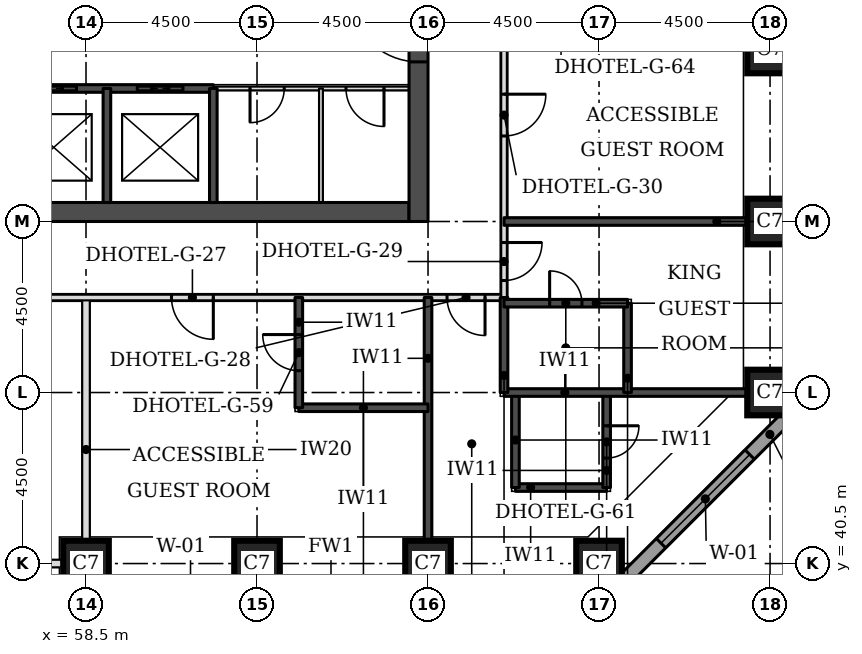
"""IFC4 building model, lengths in metres.
Left out: names, types, materials, properties, quantities, classifications, styles, units other than length and angle.
Written with IfcOpenShell. Run it as: python <this file> out.ifc"""

import sys

from ifc_helpers import new_model, si_unit, direction, frame, frame_2d, origin, origin_2d, place, context, subcontext, project, spatial, rectangle, extrude, element, fill, save


model = new_model("IFC4")
c1 = context("Model", 3, precision=1e-05, world=origin(), true_north=direction((0.0, 1.0)))
c2 = subcontext(c1, "Body", "Model", "MODEL_VIEW")
j1 = project(units=[si_unit("LENGTHUNIT", "METRE"), si_unit("PLANEANGLEUNIT", "RADIAN")], contexts=[c1])
p1 = place(None, origin())
s1 = spatial("IfcSite", under=j1, at=p1, CompositionType="ELEMENT")
p2 = place(p1, origin())
s2 = spatial("IfcBuilding", under=s1, at=p2, CompositionType="ELEMENT")
p3 = place(p2, frame((0.0, 0.0, 66.0)))
s3 = spatial("IfcBuildingStorey", under=s2, at=p3, CompositionType="ELEMENT", Elevation=66.0)
for number, where, z_axis, x_axis in (
    (1, (58.5, 40.5, 0.0), (0.0, 0.0, 1.0), (1.0, 0.0, 0.0)),
    (2, (63.0, 40.5, 0.0), (0.0, 0.0, 1.0), (1.0, 0.0, 0.0)),
    (3, (67.5, 40.5, 0.0), (0.0, 0.0, 1.0), (1.0, 0.0, 0.0)),
    (4, (72.0, 40.5, 0.0), (0.0, 0.0, 1.0), (1.0, 0.0, 0.0)),
    (5, (76.5, 45.0, 0.0), (0.0, 0.0, 1.0), (1.0, 0.0, 0.0)),
    (6, (76.5, 49.5, 0.0), (0.0, 0.0, 1.0), (1.0, 0.0, 0.0)),
    (7, (76.5, 54.0, 0.0), (0.0, 0.0, 1.0), (1.0, 0.0, 0.0)),
):
    element("IfcColumn", number, at=place(p3, frame(where, z_axis=z_axis, x_axis=x_axis)), inside=s3, PredefinedType="COLUMN", context=c2, shape_type="SweptSolid", body=[
        extrude(rectangle(XDim=1.2, YDim=1.2, at=origin_2d()), origin(), (0.0, 0.0, 1.0), 3.3),
    ])
p4 = place(p3, frame((45.5, 49.75, 0.0), z_axis=(0.0, 0.0, 1.0), x_axis=(1.0, 0.0, 0.0)))
e8 = element("IfcWall", 8, at=p4, inside=s3, PredefinedType="SHEAR", context=c2, shape_type="SweptSolid", body=[
    extrude(rectangle(XDim=21.5, YDim=0.5, at=frame_2d((10.75, 0.0))), origin(), (0.0, 0.0, 1.0), 3.3),
])
p5 = place(p3, frame((67.25, 49.5, 0.0), z_axis=(0.0, 0.0, 1.0), x_axis=(0.0, 1.0, 0.0)))
e9 = element("IfcWall", 9, at=p5, inside=s3, PredefinedType="SHEAR", context=c2, shape_type="SweptSolid", body=[
    extrude(rectangle(XDim=22.5, YDim=0.5, at=frame_2d((11.25, 0.0))), origin(), (0.0, 0.0, 1.0), 3.3),
])
p6 = place(p5, frame((4.2, 0.0, 0.0)))
e10 = element("IfcOpeningElement", 10, at=p6, cuts=e9, PredefinedType="OPENING", context=c2, shape_type="SweptSolid", body=[
    extrude(rectangle(XDim=1.8, YDim=2.1, at=frame_2d((0.9, 1.05))), frame((0.0, 0.26, 0.0), z_axis=(0.0, -1.0, 0.0), x_axis=(1.0, 0.0, 0.0)), (0.0, 0.0, 1.0), 0.52),
])
p7 = place(p5, frame((6.9, 0.0, 0.0)))
e11 = element("IfcOpeningElement", 11, at=p7, cuts=e9, PredefinedType="OPENING", context=c2, shape_type="SweptSolid", body=[
    extrude(rectangle(XDim=1.1, YDim=2.1, at=frame_2d((0.55, 1.05))), frame((0.0, 0.26, 0.0), z_axis=(0.0, -1.0, 0.0), x_axis=(1.0, 0.0, 0.0)), (0.0, 0.0, 1.0), 0.52),
])
p8 = place(p5, frame((13.6, 0.0, 0.0)))
e12 = element("IfcOpeningElement", 12, at=p8, cuts=e9, PredefinedType="OPENING", context=c2, shape_type="SweptSolid", body=[
    extrude(rectangle(XDim=1.1, YDim=2.1, at=frame_2d((0.55, 1.05))), frame((0.0, 0.26, 0.0), z_axis=(0.0, -1.0, 0.0), x_axis=(1.0, 0.0, 0.0)), (0.0, 0.0, 1.0), 0.52),
])
p9 = place(p5, frame((16.5, 0.0, 0.0)))
e13 = element("IfcOpeningElement", 13, at=p9, cuts=e9, PredefinedType="OPENING", context=c2, shape_type="SweptSolid", body=[
    extrude(rectangle(XDim=1.8, YDim=2.1, at=frame_2d((0.9, 1.05))), frame((0.0, 0.26, 0.0), z_axis=(0.0, -1.0, 0.0), x_axis=(1.0, 0.0, 0.0)), (0.0, 0.0, 1.0), 0.52),
])
p10 = place(p3, frame((72.27, 39.674, 0.0), z_axis=(0.0, 0.0, 1.0), x_axis=(0.707106781187, 0.707106781187, 0.0)))
e14 = element("IfcWall", 14, at=p10, inside=s3, PredefinedType="STANDARD", context=c2, shape_type="SweptSolid", body=[
    extrude(rectangle(XDim=7.151, YDim=0.35, at=frame_2d((3.576, 0.0))), origin(), (0.0, 0.0, 1.0), 3.055),
])
p11 = place(p10, frame((1.926, 0.0, 0.8)))
e15 = element("IfcOpeningElement", 15, at=p11, cuts=e14, PredefinedType="OPENING", context=c2, shape_type="SweptSolid", body=[
    extrude(rectangle(XDim=3.3, YDim=1.5, at=frame_2d((1.65, 0.75))), frame((0.0, 0.185, 0.0), z_axis=(0.0, -1.0, 0.0), x_axis=(1.0, 0.0, 0.0)), (0.0, 0.0, 1.0), 0.37),
])
p12 = place(p3, frame((52.1, 40.5, 0.0), z_axis=(0.0, 0.0, 1.0), x_axis=(1.0, 0.0, 0.0)))
e16 = element("IfcWall", 16, at=p12, inside=s3, PredefinedType="PARTITIONING", context=c2, shape_type="SweptSolid", body=[
    extrude(rectangle(XDim=5.8, YDim=0.2, at=frame_2d((2.9, 0.0))), origin(), (0.0, 0.0, 1.0), 2.33),
])
p13 = place(p3, frame((58.5, 41.1, 0.0), z_axis=(0.0, 0.0, 1.0), x_axis=(0.0, 1.0, 0.0)))
e17 = element("IfcWall", 17, at=p13, inside=s3, PredefinedType="PARTITIONING", context=c2, shape_type="SweptSolid", body=[
    extrude(rectangle(XDim=6.4, YDim=0.2, at=frame_2d((3.2, 0.0))), origin(), (0.0, 0.0, 1.0), 3.08),
])
p14 = place(p3, frame((52.1, 47.5, 0.0), z_axis=(0.0, 0.0, 1.0), x_axis=(1.0, 0.0, 0.0)))
e18 = element("IfcWall", 18, at=p14, inside=s3, PredefinedType="PARTITIONING", context=c2, shape_type="SweptSolid", body=[
    extrude(rectangle(XDim=17.4, YDim=0.15, at=frame_2d((8.7, 0.0))), origin(), (0.0, 0.0, 1.0), 3.08),
])
p15 = place(p14, frame((8.65, 0.0, 0.0)))
e19 = element("IfcOpeningElement", 19, at=p15, cuts=e18, PredefinedType="OPENING", context=c2, shape_type="SweptSolid", body=[
    extrude(rectangle(XDim=1.1, YDim=2.1, at=frame_2d((0.55, 1.05))), frame((0.0, 0.085, 0.0), z_axis=(0.0, -1.0, 0.0), x_axis=(1.0, 0.0, 0.0)), (0.0, 0.0, 1.0), 0.17),
])
p16 = place(p14, frame((15.9, 0.0, 0.0)))
e20 = element("IfcOpeningElement", 20, at=p16, cuts=e18, PredefinedType="OPENING", context=c2, shape_type="SweptSolid", body=[
    extrude(rectangle(XDim=1.0, YDim=2.1, at=frame_2d((0.5, 1.05))), frame((0.0, 0.085, 0.0), z_axis=(0.0, -1.0, 0.0), x_axis=(1.0, 0.0, 0.0)), (0.0, 0.0, 1.0), 0.17),
])
p17 = place(p3, frame((69.5, 47.5, 0.0), z_axis=(0.0, 0.0, 1.0), x_axis=(0.0, 1.0, 0.0)))
e21 = element("IfcWall", 21, at=p17, inside=s3, PredefinedType="PARTITIONING", context=c2, shape_type="SweptSolid", body=[
    extrude(rectangle(XDim=26.5, YDim=0.15, at=frame_2d((13.25, 0.0))), origin(), (0.0, 0.0, 1.0), 3.08),
])
p18 = place(p17, frame((25.053, 0.0, 0.0)))
e22 = element("IfcOpeningElement", 22, at=p18, cuts=e21, PredefinedType="OPENING", context=c2, shape_type="SweptSolid", body=[
    extrude(rectangle(XDim=1.0, YDim=2.1, at=frame_2d((0.5, 1.05))), frame((0.0, 0.085, 0.0), z_axis=(0.0, -1.0, 0.0), x_axis=(1.0, 0.0, 0.0)), (0.0, 0.0, 1.0), 0.17),
])
p19 = place(p17, frame((22.925, 0.0, 0.0)))
e23 = element("IfcOpeningElement", 23, at=p19, cuts=e21, PredefinedType="OPENING", context=c2, shape_type="SweptSolid", body=[
    extrude(rectangle(XDim=1.0, YDim=2.1, at=frame_2d((0.5, 1.05))), frame((0.0, 0.085, 0.0), z_axis=(0.0, -1.0, 0.0), x_axis=(1.0, 0.0, 0.0)), (0.0, 0.0, 1.0), 0.17),
])
p20 = place(p17, frame((16.325, 0.0, 0.0)))
e24 = element("IfcOpeningElement", 24, at=p20, cuts=e21, PredefinedType="OPENING", context=c2, shape_type="SweptSolid", body=[
    extrude(rectangle(XDim=1.0, YDim=2.1, at=frame_2d((0.5, 1.05))), frame((0.0, 0.085, 0.0), z_axis=(0.0, -1.0, 0.0), x_axis=(1.0, 0.0, 0.0)), (0.0, 0.0, 1.0), 0.17),
])
p21 = place(p17, frame((13.925, 0.0, 0.0)))
e25 = element("IfcOpeningElement", 25, at=p21, cuts=e21, PredefinedType="OPENING", context=c2, shape_type="SweptSolid", body=[
    extrude(rectangle(XDim=1.0, YDim=2.1, at=frame_2d((0.5, 1.05))), frame((0.0, 0.085, 0.0), z_axis=(0.0, -1.0, 0.0), x_axis=(1.0, 0.0, 0.0)), (0.0, 0.0, 1.0), 0.17),
])
p22 = place(p17, frame((4.25, 0.0, 0.0)))
e26 = element("IfcOpeningElement", 26, at=p22, cuts=e21, PredefinedType="OPENING", context=c2, shape_type="SweptSolid", body=[
    extrude(rectangle(XDim=1.1, YDim=2.1, at=frame_2d((0.55, 1.05))), frame((0.0, 0.085, 0.0), z_axis=(0.0, -1.0, 0.0), x_axis=(1.0, 0.0, 0.0)), (0.0, 0.0, 1.0), 0.17),
])
p23 = place(p17, frame((0.447, 0.0, 0.0)))
e27 = element("IfcOpeningElement", 27, at=p23, cuts=e21, PredefinedType="OPENING", context=c2, shape_type="SweptSolid", body=[
    extrude(rectangle(XDim=1.0, YDim=2.1, at=frame_2d((0.5, 1.05))), frame((0.0, 0.085, 0.0), z_axis=(0.0, -1.0, 0.0), x_axis=(1.0, 0.0, 0.0)), (0.0, 0.0, 1.0), 0.17),
])
p24 = place(p3, frame((67.5, 41.1, 0.0), z_axis=(0.0, 0.0, 1.0), x_axis=(0.0, 1.0, 0.0)))
e28 = element("IfcWall", 28, at=p24, inside=s3, PredefinedType="SOLIDWALL", context=c2, shape_type="SweptSolid", body=[
    extrude(rectangle(XDim=6.4, YDim=0.2, at=frame_2d((3.2, 0.0))), origin(), (0.0, 0.0, 1.0), 3.08),
])
p25 = place(p3, frame((69.8, 42.5, 0.0), z_axis=(0.0, 0.0, 1.0), x_axis=(1.0, 0.0, 0.0)))
e29 = element("IfcWall", 29, at=p25, inside=s3, PredefinedType="SOLIDWALL", context=c2, shape_type="SweptSolid", body=[
    extrude(rectangle(XDim=2.4, YDim=0.2, at=frame_2d((1.2, 0.0))), origin(), (0.0, 0.0, 1.0), 3.08),
])
p26 = place(p3, frame((69.8, 42.5, 0.0), z_axis=(0.0, 0.0, 1.0), x_axis=(0.0, 1.0, 0.0)))
e30 = element("IfcWall", 30, at=p26, inside=s3, PredefinedType="SOLIDWALL", context=c2, shape_type="SweptSolid", body=[
    extrude(rectangle(XDim=2.5, YDim=0.2, at=frame_2d((1.25, 0.0))), origin(), (0.0, 0.0, 1.0), 3.08),
])
p27 = place(p3, frame((72.2, 42.5, 0.0), z_axis=(0.0, 0.0, 1.0), x_axis=(0.0, 1.0, 0.0)))
e31 = element("IfcWall", 31, at=p27, inside=s3, PredefinedType="SOLIDWALL", context=c2, shape_type="SweptSolid", body=[
    extrude(rectangle(XDim=2.5, YDim=0.2, at=frame_2d((1.25, 0.0))), origin(), (0.0, 0.0, 1.0), 3.08),
])
p28 = place(p27, frame((0.775, 0.0, 0.0)))
e32 = element("IfcOpeningElement", 32, at=p28, cuts=e31, PredefinedType="OPENING", context=c2, shape_type="SweptSolid", body=[
    extrude(rectangle(XDim=0.85, YDim=2.1, at=frame_2d((0.425, 1.05))), frame((0.0, 0.11, 0.0), z_axis=(0.0, -1.0, 0.0), x_axis=(1.0, 0.0, 0.0)), (0.0, 0.0, 1.0), 0.22),
])
p29 = place(p3, frame((64.1, 44.6, 0.0), z_axis=(0.0, 0.0, 1.0), x_axis=(1.0, 0.0, 0.0)))
e33 = element("IfcWall", 33, at=p29, inside=s3, PredefinedType="SOLIDWALL", context=c2, shape_type="SweptSolid", body=[
    extrude(rectangle(XDim=3.4, YDim=0.2, at=frame_2d((1.7, 0.0))), origin(), (0.0, 0.0, 1.0), 3.08),
])
p30 = place(p3, frame((64.1, 44.6, 0.0), z_axis=(0.0, 0.0, 1.0), x_axis=(0.0, 1.0, 0.0)))
e34 = element("IfcWall", 34, at=p30, inside=s3, PredefinedType="SOLIDWALL", context=c2, shape_type="SweptSolid", body=[
    extrude(rectangle(XDim=2.9, YDim=0.2, at=frame_2d((1.45, 0.0))), origin(), (0.0, 0.0, 1.0), 3.08),
])
p31 = place(p30, frame((0.975, 0.0, 0.0)))
e35 = element("IfcOpeningElement", 35, at=p31, cuts=e34, PredefinedType="OPENING", context=c2, shape_type="SweptSolid", body=[
    extrude(rectangle(XDim=0.95, YDim=2.1, at=frame_2d((0.475, 1.05))), frame((0.0, 0.11, 0.0), z_axis=(0.0, -1.0, 0.0), x_axis=(1.0, 0.0, 0.0)), (0.0, 0.0, 1.0), 0.22),
])
p32 = place(p3, frame((69.5, 45.0, 0.0), z_axis=(0.0, 0.0, 1.0), x_axis=(1.0, 0.0, 0.0)))
e36 = element("IfcWall", 36, at=p32, inside=s3, PredefinedType="SOLIDWALL", context=c2, shape_type="SweptSolid", body=[
    extrude(rectangle(XDim=6.4, YDim=0.2, at=frame_2d((3.2, 0.0))), origin(), (0.0, 0.0, 1.0), 3.08),
])
p33 = place(p3, frame((69.5, 45.0, 0.0), z_axis=(0.0, 0.0, 1.0), x_axis=(0.0, 1.0, 0.0)))
e37 = element("IfcWall", 37, at=p33, inside=s3, PredefinedType="SOLIDWALL", context=c2, shape_type="SweptSolid", body=[
    extrude(rectangle(XDim=2.5, YDim=0.2, at=frame_2d((1.25, 0.0))), origin(), (0.0, 0.0, 1.0), 3.08),
])
p34 = place(p3, frame((72.75, 45.0, 0.0), z_axis=(0.0, 0.0, 1.0), x_axis=(0.0, 1.0, 0.0)))
e38 = element("IfcWall", 38, at=p34, inside=s3, PredefinedType="SOLIDWALL", context=c2, shape_type="SweptSolid", body=[
    extrude(rectangle(XDim=2.35, YDim=0.2, at=frame_2d((1.175, 0.0))), origin(), (0.0, 0.0, 1.0), 3.08),
])
p35 = place(p3, frame((69.5, 47.35, 0.0), z_axis=(0.0, 0.0, 1.0), x_axis=(1.0, 0.0, 0.0)))
e39 = element("IfcWall", 39, at=p35, inside=s3, PredefinedType="SOLIDWALL", context=c2, shape_type="SweptSolid", body=[
    extrude(rectangle(XDim=3.25, YDim=0.2, at=frame_2d((1.625, 0.0))), origin(), (0.0, 0.0, 1.0), 3.08),
])
p36 = place(p35, frame((1.2, 0.0, 0.0)))
e40 = element("IfcOpeningElement", 40, at=p36, cuts=e39, PredefinedType="OPENING", context=c2, shape_type="SweptSolid", body=[
    extrude(rectangle(XDim=0.85, YDim=2.1, at=frame_2d((0.425, 1.05))), frame((0.0, 0.11, 0.0), z_axis=(0.0, -1.0, 0.0), x_axis=(1.0, 0.0, 0.0)), (0.0, 0.0, 1.0), 0.22),
])
p37 = place(p3, frame((69.5, 49.5, 0.0), z_axis=(0.0, 0.0, 1.0), x_axis=(1.0, 0.0, 0.0)))
e41 = element("IfcWall", 41, at=p37, inside=s3, PredefinedType="SOLIDWALL", context=c2, shape_type="SweptSolid", body=[
    extrude(rectangle(XDim=6.4, YDim=0.2, at=frame_2d((3.2, 0.0))), origin(), (0.0, 0.0, 1.0), 3.08),
])
p38 = place(p3, frame((61.85, 53.0, 0.0), z_axis=(0.0, 0.0, 1.0), x_axis=(1.0, 0.0, 0.0)))
e42 = element("IfcWall", 42, at=p38, inside=s3, PredefinedType="PARTITIONING", context=c2, shape_type="SweptSolid", body=[
    extrude(rectangle(XDim=5.15, YDim=0.1, at=frame_2d((2.575, 0.0))), origin(), (0.0, 0.0, 1.0), 3.08),
])
p39 = place(p38, frame((3.491, 0.0, 0.0)))
e43 = element("IfcOpeningElement", 43, at=p39, cuts=e42, PredefinedType="OPENING", context=c2, shape_type="SweptSolid", body=[
    extrude(rectangle(XDim=1.0, YDim=2.1, at=frame_2d((0.5, 1.05))), frame((0.0, 0.06, 0.0), z_axis=(0.0, -1.0, 0.0), x_axis=(1.0, 0.0, 0.0)), (0.0, 0.0, 1.0), 0.12),
])
p40 = place(p38, frame((0.966, 0.0, 0.0)))
e44 = element("IfcOpeningElement", 44, at=p40, cuts=e42, PredefinedType="OPENING", context=c2, shape_type="SweptSolid", body=[
    extrude(rectangle(XDim=0.9, YDim=2.1, at=frame_2d((0.45, 1.05))), frame((0.0, 0.06, 0.0), z_axis=(0.0, -1.0, 0.0), x_axis=(1.0, 0.0, 0.0)), (0.0, 0.0, 1.0), 0.12),
])
p41 = place(p3, frame((50.65, 53.0, 0.0), z_axis=(0.0, 0.0, 1.0), x_axis=(1.0, 0.0, 0.0)))
e45 = element("IfcWall", 45, at=p41, inside=s3, PredefinedType="SOLIDWALL", context=c2, shape_type="SweptSolid", body=[
    extrude(rectangle(XDim=11.2, YDim=0.2, at=frame_2d((5.6, 0.0))), origin(), (0.0, 0.0, 1.0), 3.08),
])
p42 = place(p41, frame((0.8, 0.0, 0.0)))
e46 = element("IfcOpeningElement", 46, at=p42, cuts=e45, PredefinedType="OPENING", context=c2, shape_type="SweptSolid", body=[
    extrude(rectangle(XDim=1.2, YDim=2.1, at=frame_2d((0.6, 1.05))), frame((0.0, 0.11, 0.0), z_axis=(0.0, -1.0, 0.0), x_axis=(1.0, 0.0, 0.0)), (0.0, 0.0, 1.0), 0.22),
])
p43 = place(p41, frame((3.6, 0.0, 0.0)))
e47 = element("IfcOpeningElement", 47, at=p43, cuts=e45, PredefinedType="OPENING", context=c2, shape_type="SweptSolid", body=[
    extrude(rectangle(XDim=1.2, YDim=2.1, at=frame_2d((0.6, 1.05))), frame((0.0, 0.11, 0.0), z_axis=(0.0, -1.0, 0.0), x_axis=(1.0, 0.0, 0.0)), (0.0, 0.0, 1.0), 0.22),
])
p44 = place(p41, frame((6.4, 0.0, 0.0)))
e48 = element("IfcOpeningElement", 48, at=p44, cuts=e45, PredefinedType="OPENING", context=c2, shape_type="SweptSolid", body=[
    extrude(rectangle(XDim=1.2, YDim=2.1, at=frame_2d((0.6, 1.05))), frame((0.0, 0.11, 0.0), z_axis=(0.0, -1.0, 0.0), x_axis=(1.0, 0.0, 0.0)), (0.0, 0.0, 1.0), 0.22),
])
p45 = place(p41, frame((9.2, 0.0, 0.0)))
e49 = element("IfcOpeningElement", 49, at=p45, cuts=e45, PredefinedType="OPENING", context=c2, shape_type="SweptSolid", body=[
    extrude(rectangle(XDim=1.2, YDim=2.1, at=frame_2d((0.6, 1.05))), frame((0.0, 0.11, 0.0), z_axis=(0.0, -1.0, 0.0), x_axis=(1.0, 0.0, 0.0)), (0.0, 0.0, 1.0), 0.22),
])
for number, where, z_axis, x_axis in (
    (50, (59.05, 50.0, 0.0), (0.0, 0.0, 1.0), (0.0, 1.0, 0.0)),
    (51, (61.85, 50.0, 0.0), (0.0, 0.0, 1.0), (0.0, 1.0, 0.0)),
):
    element("IfcWall", number, at=place(p3, frame(where, z_axis=z_axis, x_axis=x_axis)), inside=s3, PredefinedType="SOLIDWALL", context=c2, shape_type="SweptSolid", body=[
        extrude(rectangle(XDim=3.0, YDim=0.2, at=frame_2d((1.5, 0.0))), origin(), (0.0, 0.0, 1.0), 3.08),
    ])
p46 = place(p3, frame((64.683, 50.0, 0.0), z_axis=(0.0, 0.0, 1.0), x_axis=(0.0, 1.0, 0.0)))
e52 = element("IfcWall", 52, at=p46, inside=s3, PredefinedType="PARTITIONING", context=c2, shape_type="SweptSolid", body=[
    extrude(rectangle(XDim=3.0, YDim=0.1, at=frame_2d((1.5, 0.0))), origin(), (0.0, 0.0, 1.0), 3.08),
])
p47 = place(p11, origin())
e53 = element("IfcWindow", 53, at=p47, inside=s3, PartitioningType="SINGLE_PANEL", PredefinedType="WINDOW", context=c2, shape_type="SweptSolid", body=[
    extrude(rectangle(XDim=3.3, YDim=1.5, at=frame_2d((1.65, 0.75))), frame((0.0, 0.085, 0.0), z_axis=(0.0, -1.0, 0.0), x_axis=(1.0, 0.0, 0.0)), (0.0, 0.0, 1.0), 0.06),
])
fill(e15, e53)
p48 = place(p22, frame((1.1, 0.0, 0.0), z_axis=(0.0, 0.0, 1.0), x_axis=(-1.0, 0.0, 0.0)))
e54 = element("IfcDoor", 54, at=p48, inside=s3, OperationType="SINGLE_SWING_LEFT", PredefinedType="DOOR", context=c2, shape_type="SweptSolid", body=[
    extrude(rectangle(XDim=1.1, YDim=2.1, at=frame_2d((0.55, 1.05))), frame((0.0, 0.025, 0.0), z_axis=(0.0, -1.0, 0.0), x_axis=(1.0, 0.0, 0.0)), (0.0, 0.0, 1.0), 0.05),
])
fill(e26, e54)
p49 = place(p23, frame((1.0, 0.0, 0.0), z_axis=(0.0, 0.0, 1.0), x_axis=(-1.0, 0.0, 0.0)))
e55 = element("IfcDoor", 55, at=p49, inside=s3, OperationType="SINGLE_SWING_LEFT", PredefinedType="DOOR", context=c2, shape_type="SweptSolid", body=[
    extrude(rectangle(XDim=1.0, YDim=2.1, at=frame_2d((0.5, 1.05))), frame((0.0, 0.025, 0.0), z_axis=(0.0, -1.0, 0.0), x_axis=(1.0, 0.0, 0.0)), (0.0, 0.0, 1.0), 0.05),
])
fill(e27, e55)
p50 = place(p36, origin())
e56 = element("IfcDoor", 56, at=p50, inside=s3, OperationType="SINGLE_SWING_LEFT", PredefinedType="DOOR", context=c2, shape_type="SweptSolid", body=[
    extrude(rectangle(XDim=0.85, YDim=2.1, at=frame_2d((0.425, 1.05))), frame((0.0, 0.025, 0.0), z_axis=(0.0, -1.0, 0.0), x_axis=(1.0, 0.0, 0.0)), (0.0, 0.0, 1.0), 0.05),
])
fill(e40, e56)
p51 = place(p15, frame((1.1, 0.0, 0.0), z_axis=(0.0, 0.0, 1.0), x_axis=(-1.0, 0.0, 0.0)))
e57 = element("IfcDoor", 57, at=p51, inside=s3, OperationType="SINGLE_SWING_LEFT", PredefinedType="DOOR", context=c2, shape_type="SweptSolid", body=[
    extrude(rectangle(XDim=1.1, YDim=2.1, at=frame_2d((0.55, 1.05))), frame((0.0, 0.025, 0.0), z_axis=(0.0, -1.0, 0.0), x_axis=(1.0, 0.0, 0.0)), (0.0, 0.0, 1.0), 0.05),
])
fill(e19, e57)
p52 = place(p31, origin())
e58 = element("IfcDoor", 58, at=p52, inside=s3, OperationType="SINGLE_SWING_RIGHT", PredefinedType="DOOR", context=c2, shape_type="SweptSolid", body=[
    extrude(rectangle(XDim=0.95, YDim=2.1, at=frame_2d((0.475, 1.05))), frame((0.0, 0.025, 0.0), z_axis=(0.0, -1.0, 0.0), x_axis=(1.0, 0.0, 0.0)), (0.0, 0.0, 1.0), 0.05),
])
fill(e35, e58)
p53 = place(p16, frame((1.0, 0.0, 0.0), z_axis=(0.0, 0.0, 1.0), x_axis=(-1.0, 0.0, 0.0)))
e59 = element("IfcDoor", 59, at=p53, inside=s3, OperationType="SINGLE_SWING_LEFT", PredefinedType="DOOR", context=c2, shape_type="SweptSolid", body=[
    extrude(rectangle(XDim=1.0, YDim=2.1, at=frame_2d((0.5, 1.05))), frame((0.0, 0.025, 0.0), z_axis=(0.0, -1.0, 0.0), x_axis=(1.0, 0.0, 0.0)), (0.0, 0.0, 1.0), 0.05),
])
fill(e20, e59)
p54 = place(p28, frame((0.85, 0.0, 0.0), z_axis=(0.0, 0.0, 1.0), x_axis=(-1.0, 0.0, 0.0)))
e60 = element("IfcDoor", 60, at=p54, inside=s3, OperationType="SINGLE_SWING_LEFT", PredefinedType="DOOR", context=c2, shape_type="SweptSolid", body=[
    extrude(rectangle(XDim=0.85, YDim=2.1, at=frame_2d((0.425, 1.05))), frame((0.0, 0.025, 0.0), z_axis=(0.0, -1.0, 0.0), x_axis=(1.0, 0.0, 0.0)), (0.0, 0.0, 1.0), 0.05),
])
fill(e32, e60)
p55 = place(p44, origin())
e61 = element("IfcDoor", 61, at=p55, inside=s3, OperationType="DOUBLE_DOOR_SLIDING", PredefinedType="DOOR", context=c2, shape_type="SweptSolid", body=[
    extrude(rectangle(XDim=1.2, YDim=2.1, at=frame_2d((0.6, 1.05))), frame((0.0, 0.025, 0.0), z_axis=(0.0, -1.0, 0.0), x_axis=(1.0, 0.0, 0.0)), (0.0, 0.0, 1.0), 0.05),
])
fill(e48, e61)
p56 = place(p45, origin())
e62 = element("IfcDoor", 62, at=p56, inside=s3, OperationType="DOUBLE_DOOR_SLIDING", PredefinedType="DOOR", context=c2, shape_type="SweptSolid", body=[
    extrude(rectangle(XDim=1.2, YDim=2.1, at=frame_2d((0.6, 1.05))), frame((0.0, 0.025, 0.0), z_axis=(0.0, -1.0, 0.0), x_axis=(1.0, 0.0, 0.0)), (0.0, 0.0, 1.0), 0.05),
])
fill(e49, e62)
p57 = place(p6, origin())
e63 = element("IfcDoor", 63, at=p57, inside=s3, OperationType="SINGLE_SWING_RIGHT", PredefinedType="DOOR", context=c2, shape_type="SweptSolid", body=[
    extrude(rectangle(XDim=1.8, YDim=2.1, at=frame_2d((0.9, 1.05))), frame((0.0, 0.025, 0.0), z_axis=(0.0, -1.0, 0.0), x_axis=(1.0, 0.0, 0.0)), (0.0, 0.0, 1.0), 0.05),
])
fill(e10, e63)
p58 = place(p39, frame((1.0, 0.0, 0.0), z_axis=(0.0, 0.0, 1.0), x_axis=(-1.0, 0.0, 0.0)))
e64 = element("IfcDoor", 64, at=p58, inside=s3, OperationType="SINGLE_SWING_LEFT", PredefinedType="DOOR", context=c2, shape_type="SweptSolid", body=[
    extrude(rectangle(XDim=1.0, YDim=2.1, at=frame_2d((0.5, 1.05))), frame((0.0, 0.025, 0.0), z_axis=(0.0, -1.0, 0.0), x_axis=(1.0, 0.0, 0.0)), (0.0, 0.0, 1.0), 0.05),
])
fill(e43, e64)
p59 = place(p40, frame((0.9, 0.0, 0.0), z_axis=(0.0, 0.0, 1.0), x_axis=(-1.0, 0.0, 0.0)))
e65 = element("IfcDoor", 65, at=p59, inside=s3, OperationType="SINGLE_SWING_RIGHT", PredefinedType="DOOR", context=c2, shape_type="SweptSolid", body=[
    extrude(rectangle(XDim=0.9, YDim=2.1, at=frame_2d((0.45, 1.05))), frame((0.0, 0.025, 0.0), z_axis=(0.0, -1.0, 0.0), x_axis=(1.0, 0.0, 0.0)), (0.0, 0.0, 1.0), 0.05),
])
fill(e44, e65)
save(model, sys.argv[1])
